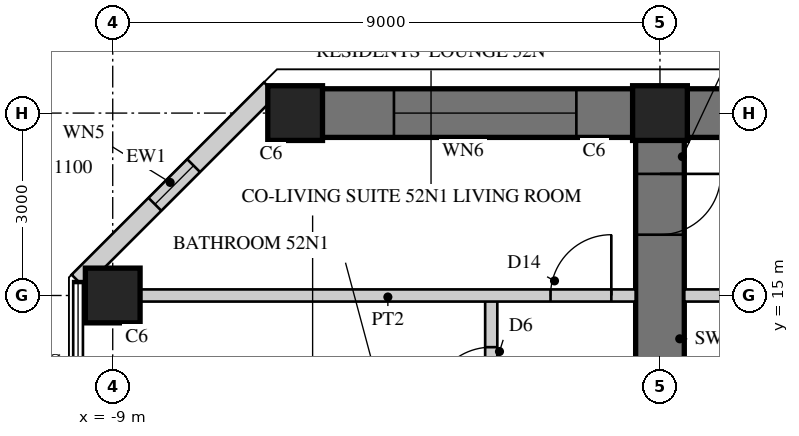
"""IFC4 building model, lengths in metres.
Left out: names, types, materials, properties, quantities, classifications, styles, units other than length and angle.
Written with IfcOpenShell. Run it as: python <this file> out.ifc"""

import sys

from ifc_helpers import new_model, si_unit, direction, frame, frame_2d, origin, origin_2d, place, context, subcontext, project, spatial, rectangle, hollow_rectangle, extrude, element, fill, save


model = new_model("IFC4")
c1 = context("Model", 3, precision=1e-05, world=origin(), true_north=direction((0.0, 1.0)))
c2 = subcontext(c1, "Body", "Model", "MODEL_VIEW")
j1 = project(units=[si_unit("LENGTHUNIT", "METRE"), si_unit("PLANEANGLEUNIT", "RADIAN")], contexts=[c1])
p1 = place(None, origin())
s1 = spatial("IfcSite", under=j1, at=p1, CompositionType="ELEMENT")
p2 = place(p1, origin())
s2 = spatial("IfcBuilding", under=s1, at=p2, CompositionType="ELEMENT")
p3 = place(p2, frame((0.0, 0.0, 206.9)))
s3 = spatial("IfcBuildingStorey", under=s2, at=p3, CompositionType="ELEMENT", Elevation=206.9)
p4 = place(p3, frame((0.0, 9.0, 0.0), z_axis=(0.0, 0.0, 1.0), x_axis=(0.0, 1.0, 0.0)))
e1 = element("IfcWall", 1, at=p4, inside=s3, PredefinedType="SHEAR", context=c2, shape_type="SweptSolid", body=[
    extrude(rectangle(XDim=9.0, YDim=0.8, at=frame_2d((4.5, 0.0))), origin(), (0.0, 0.0, 1.0), 3.4),
])
p5 = place(p4, frame((3.95, 0.0, 0.0)))
e2 = element("IfcOpeningElement", 2, at=p5, cuts=e1, PredefinedType="OPENING", context=c2, shape_type="SweptSolid", body=[
    extrude(rectangle(XDim=1.0, YDim=2.15, at=frame_2d((0.5, 1.075))), frame((0.0, 0.41, 0.0), z_axis=(0.0, -1.0, 0.0), x_axis=(1.0, 0.0, 0.0)), (0.0, 0.0, 1.0), 0.82),
])
p6 = place(p4, frame((7.0, 0.0, 0.0)))
e3 = element("IfcOpeningElement", 3, at=p6, cuts=e1, PredefinedType="OPENING", context=c2, shape_type="SweptSolid", body=[
    extrude(rectangle(XDim=1.0, YDim=2.2, at=frame_2d((0.5, 1.1))), frame((0.0, 0.41, 0.0), z_axis=(0.0, -1.0, 0.0), x_axis=(1.0, 0.0, 0.0)), (0.0, 0.0, 1.0), 0.82),
])
p7 = place(p3, frame((6.0, 18.0, 0.0), z_axis=(0.0, 0.0, 1.0), x_axis=(-1.0, 0.0, 0.0)))
e4 = element("IfcWall", 4, at=p7, inside=s3, PredefinedType="SHEAR", context=c2, shape_type="SweptSolid", body=[
    extrude(rectangle(XDim=12.0, YDim=0.8, at=frame_2d((6.0, 0.0))), origin(), (0.0, 0.0, 1.0), 3.4),
])
p8 = place(p7, frame((1.625, 0.0, 0.6)))
e5 = element("IfcOpeningElement", 5, at=p8, cuts=e4, PredefinedType="OPENING", context=c2, shape_type="SweptSolid", body=[
    extrude(rectangle(XDim=3.0, YDim=2.4, at=frame_2d((1.5, 1.2))), frame((0.0, 0.41, 0.0), z_axis=(0.0, -1.0, 0.0), x_axis=(1.0, 0.0, 0.0)), (0.0, 0.0, 1.0), 0.82),
])
p9 = place(p7, frame((7.375, 0.0, 0.6)))
e6 = element("IfcOpeningElement", 6, at=p9, cuts=e4, PredefinedType="OPENING", context=c2, shape_type="SweptSolid", body=[
    extrude(rectangle(XDim=3.0, YDim=2.4, at=frame_2d((1.5, 1.2))), frame((0.0, 0.41, 0.0), z_axis=(0.0, -1.0, 0.0), x_axis=(1.0, 0.0, 0.0)), (0.0, 0.0, 1.0), 0.82),
])
for number, where, z_axis, x_axis in (
    (7, (-9.0, 15.0, 0.0), (0.0, 0.0, 1.0), (1.0, 0.0, 0.0)),
    (8, (0.0, 18.0, 0.0), (0.0, 0.0, 1.0), (1.0, 0.0, 0.0)),
    (9, (-6.0, 18.0, 0.0), (0.0, 0.0, 1.0), (1.0, 0.0, 0.0)),
):
    element("IfcColumn", number, at=place(p3, frame(where, z_axis=z_axis, x_axis=x_axis)), inside=s3, PredefinedType="COLUMN", context=c2, shape_type="SweptSolid", body=[
        extrude(rectangle(XDim=0.9, YDim=0.9, at=origin_2d()), origin(), (0.0, 0.0, 1.0), 3.4),
    ])
p10 = place(p3, frame((-6.406, 18.4, 0.0), z_axis=(0.0, 0.0, 1.0), x_axis=(-0.707134062067, -0.707079499254, 0.0)))
e10 = element("IfcWall", 10, at=p10, inside=s3, PredefinedType="SOLIDWALL", context=c2, shape_type="SweptSolid", body=[
    extrude(rectangle(XDim=4.475, YDim=0.3, at=frame_2d((2.237, 0.0))), origin(), (0.0, 0.0, 1.0), 3.22),
])
p11 = place(p10, frame((1.787, 0.0, 0.3)))
e11 = element("IfcOpeningElement", 11, at=p11, cuts=e10, PredefinedType="OPENING", context=c2, shape_type="SweptSolid", body=[
    extrude(rectangle(XDim=0.9, YDim=2.4, at=frame_2d((0.45, 1.2))), frame((0.0, 0.16, 0.0), z_axis=(0.0, -1.0, 0.0), x_axis=(1.0, 0.0, 0.0)), (0.0, 0.0, 1.0), 0.32),
])
p12 = place(p3, frame((-2.775, 9.55, 0.0), z_axis=(0.0, 0.0, 1.0), x_axis=(0.0, 1.0, 0.0)))
e12 = element("IfcWall", 12, at=p12, inside=s3, PredefinedType="SOLIDWALL", context=c2, shape_type="SweptSolid", body=[
    extrude(rectangle(XDim=5.45, YDim=0.2, at=frame_2d((2.725, 0.0))), origin(), (0.0, 0.0, 1.0), 3.22),
])
p13 = place(p12, frame((3.6, 0.0, 0.0)))
e13 = element("IfcOpeningElement", 13, at=p13, cuts=e12, PredefinedType="OPENING", context=c2, shape_type="SweptSolid", body=[
    extrude(rectangle(XDim=1.0, YDim=2.15, at=frame_2d((0.5, 1.075))), frame((0.0, 0.11, 0.0), z_axis=(0.0, -1.0, 0.0), x_axis=(1.0, 0.0, 0.0)), (0.0, 0.0, 1.0), 0.22),
])
p14 = place(p3, frame((8.55, 15.0, 0.0), z_axis=(0.0, 0.0, 1.0), x_axis=(-1.0, 0.0, 0.0)))
e14 = element("IfcWall", 14, at=p14, inside=s3, PredefinedType="SOLIDWALL", context=c2, shape_type="SweptSolid", body=[
    extrude(rectangle(XDim=8.15, YDim=0.2, at=frame_2d((4.075, 0.0))), origin(), (0.0, 0.0, 1.0), 2.47),
])
p15 = place(p3, frame((-0.4, 15.0, 0.0), z_axis=(0.0, 0.0, 1.0), x_axis=(-1.0, 0.0, 0.0)))
e15 = element("IfcWall", 15, at=p15, inside=s3, PredefinedType="SOLIDWALL", context=c2, shape_type="SweptSolid", body=[
    extrude(rectangle(XDim=8.15, YDim=0.2, at=frame_2d((4.075, 0.0))), origin(), (0.0, 0.0, 1.0), 2.47),
])
p16 = place(p15, frame((0.4, 0.0, 0.0)))
e16 = element("IfcOpeningElement", 16, at=p16, cuts=e15, PredefinedType="OPENING", context=c2, shape_type="SweptSolid", body=[
    extrude(rectangle(XDim=1.0, YDim=2.2, at=frame_2d((0.5, 1.1))), frame((0.0, 0.11, 0.0), z_axis=(0.0, -1.0, 0.0), x_axis=(1.0, 0.0, 0.0)), (0.0, 0.0, 1.0), 0.22),
])
p17 = place(p9, origin())
e17 = element("IfcWindow", 17, at=p17, inside=s3, PartitioningType="SINGLE_PANEL", PredefinedType="WINDOW", context=c2, shape_type="SweptSolid", body=[
    extrude(hollow_rectangle(XDim=3.0, YDim=2.4, WallThickness=0.06, at=frame_2d((1.5, 1.2))), frame((0.0, 0.03, 0.0), z_axis=(0.0, -1.0, 0.0), x_axis=(1.0, 0.0, 0.0)), (0.0, 0.0, 1.0), 0.06),
    extrude(rectangle(XDim=2.879, YDim=2.279, at=frame_2d((1.5, 1.2))), frame((0.0, 0.03, 0.0), z_axis=(0.0, -1.0, 0.0), x_axis=(1.0, 0.0, 0.0)), (0.0, 0.0, 1.0), 0.06),
])
fill(e6, e17)
p18 = place(p11, origin())
e18 = element("IfcWindow", 18, at=p18, inside=s3, PartitioningType="SINGLE_PANEL", PredefinedType="WINDOW", context=c2, shape_type="SweptSolid", body=[
    extrude(hollow_rectangle(XDim=0.9, YDim=2.4, WallThickness=0.06, at=frame_2d((0.45, 1.2))), frame((0.0, 0.03, 0.0), z_axis=(0.0, -1.0, 0.0), x_axis=(1.0, 0.0, 0.0)), (0.0, 0.0, 1.0), 0.06),
    extrude(rectangle(XDim=0.779, YDim=2.279, at=frame_2d((0.45, 1.2))), frame((0.0, 0.03, 0.0), z_axis=(0.0, -1.0, 0.0), x_axis=(1.0, 0.0, 0.0)), (0.0, 0.0, 1.0), 0.06),
])
fill(e11, e18)
p19 = place(p13, origin())
e19 = element("IfcDoor", 19, at=p19, inside=s3, OperationType="SINGLE_SWING_LEFT", PredefinedType="DOOR", context=c2, shape_type="SweptSolid", body=[
    extrude(rectangle(XDim=1.0, YDim=2.15, at=frame_2d((0.5, 1.075))), frame((0.0, 0.025, 0.0), z_axis=(0.0, -1.0, 0.0), x_axis=(1.0, 0.0, 0.0)), (0.0, 0.0, 1.0), 0.05),
])
fill(e13, e19)
p20 = place(p16, frame((1.0, 0.0, 0.0), z_axis=(0.0, 0.0, 1.0), x_axis=(-1.0, 0.0, 0.0)))
e20 = element("IfcDoor", 20, at=p20, inside=s3, OperationType="SINGLE_SWING_RIGHT", PredefinedType="DOOR", context=c2, shape_type="SweptSolid", body=[
    extrude(rectangle(XDim=1.0, YDim=2.2, at=frame_2d((0.5, 1.1))), frame((0.0, 0.025, 0.0), z_axis=(0.0, -1.0, 0.0), x_axis=(1.0, 0.0, 0.0)), (0.0, 0.0, 1.0), 0.05),
])
fill(e16, e20)
p21 = place(p6, frame((1.0, 0.0, 0.0), z_axis=(0.0, 0.0, 1.0), x_axis=(-1.0, 0.0, 0.0)))
e21 = element("IfcDoor", 21, at=p21, inside=s3, OperationType="SINGLE_SWING_LEFT", PredefinedType="DOOR", context=c2, shape_type="SweptSolid", body=[
    extrude(rectangle(XDim=1.0, YDim=2.2, at=frame_2d((0.5, 1.1))), frame((0.0, 0.025, 0.0), z_axis=(0.0, -1.0, 0.0), x_axis=(1.0, 0.0, 0.0)), (0.0, 0.0, 1.0), 0.05),
])
fill(e3, e21)
save(model, sys.argv[1])
